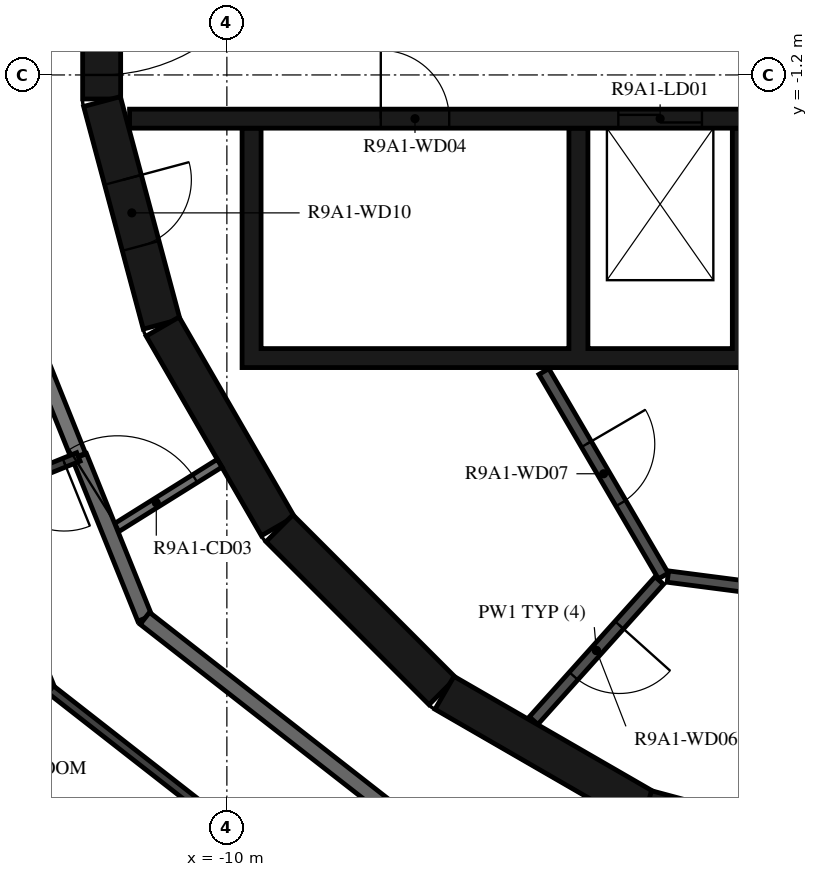
"""IFC4 building model, lengths in metres.
Left out: names, types, materials, properties, quantities, classifications, styles, units other than length and angle.
Written with IfcOpenShell. Run it as: python <this file> out.ifc"""

import sys

from ifc_helpers import new_model, si_unit, direction, frame, frame_2d, origin, place, context, subcontext, project, spatial, polyline, rectangle, outline, extrude, element, fill, save


model = new_model("IFC4")
c1 = context("Model", 3, precision=1e-05, world=origin(), true_north=direction((0.0, 1.0)))
c2 = subcontext(c1, "Body", "Model", "MODEL_VIEW")
j1 = project(units=[si_unit("LENGTHUNIT", "METRE"), si_unit("PLANEANGLEUNIT", "RADIAN")], contexts=[c1])
p1 = place(None, origin())
s1 = spatial("IfcSite", under=j1, at=p1, CompositionType="ELEMENT")
p2 = place(p1, origin())
s2 = spatial("IfcBuilding", under=s1, at=p2, CompositionType="ELEMENT")
p3 = place(p2, frame((0.0, 0.0, 336.5)))
s3 = spatial("IfcBuildingStorey", under=s2, at=p3, CompositionType="ELEMENT", Elevation=336.5)
p4 = place(p3, frame((-11.647, 1.516, 0.0), z_axis=(0.0, 0.0, 1.0), x_axis=(0.0, -1.0, 0.0)))
e1 = element("IfcWall", 1, at=p4, inside=s3, PredefinedType="SHEAR", context=c2, shape_type="SweptSolid", body=[
    extrude(rectangle(XDim=3.033, YDim=0.5, at=frame_2d((1.516, 0.0))), origin(), (0.0, 0.0, 1.0), 3.12),
])
p5 = place(p4, frame((0.316, 0.0, 0.0)))
e2 = element("IfcOpeningElement", 2, at=p5, cuts=e1, PredefinedType="OPENING", context=c2, shape_type="SweptSolid", body=[
    extrude(rectangle(XDim=2.4, YDim=2.1, at=frame_2d((1.2, 1.05))), frame((0.0, 0.26, 0.0), z_axis=(0.0, -1.0, 0.0), x_axis=(1.0, 0.0, 0.0)), (0.0, 0.0, 1.0), 0.52),
])
p6 = place(p3, frame((-11.643, -1.55, 0.0), z_axis=(0.0, 0.0, 1.0), x_axis=(0.258734743916, -0.965948410781, 0.0)))
e3 = element("IfcWall", 3, at=p6, inside=s3, PredefinedType="SHEAR", context=c2, shape_type="SweptSolid", body=[
    extrude(rectangle(XDim=3.033, YDim=0.5, at=frame_2d((1.516, 0.0))), origin(), (0.0, 0.0, 1.0), 3.12),
])
p7 = place(p6, frame((1.066, 0.0, 0.0)))
e4 = element("IfcOpeningElement", 4, at=p7, cuts=e3, PredefinedType="OPENING", context=c2, shape_type="SweptSolid", body=[
    extrude(rectangle(XDim=0.9, YDim=2.1, at=frame_2d((0.45, 1.05))), frame((0.0, 0.26, 0.0), z_axis=(0.0, -1.0, 0.0), x_axis=(1.0, 0.0, 0.0)), (0.0, 0.0, 1.0), 0.52),
])
p8 = place(p3, frame((-10.845, -4.51, 0.0), z_axis=(0.0, 0.0, 1.0), x_axis=(0.500087131594, -0.865975092491, 0.0)))
e5 = element("IfcWall", 5, at=p8, inside=s3, PredefinedType="SHEAR", context=c2, shape_type="SweptSolid", body=[
    extrude(rectangle(XDim=3.033, YDim=0.5, at=frame_2d((1.516, 0.0))), origin(), (0.0, 0.0, 1.0), 3.12),
])
p9 = place(p3, frame((-9.308, -7.164, 0.0), z_axis=(0.0, 0.0, 1.0), x_axis=(0.707106781187, -0.707106781187, 0.0)))
e6 = element("IfcWall", 6, at=p9, inside=s3, PredefinedType="SHEAR", context=c2, shape_type="SweptSolid", body=[
    extrude(rectangle(XDim=3.032, YDim=0.5, at=frame_2d((1.516, 0.0))), origin(), (0.0, 0.0, 1.0), 3.12),
])
for number, where, z_axis, x_axis in (
    (7, (-7.137, -9.329, 0.0), (0.0, 0.0, 1.0), (0.866, -0.5, 0.0)),
    (8, (-4.479, -10.858, 0.0), (0.0, 0.0, 1.0), (0.966, -0.259, 0.0)),
):
    element("IfcWall", number, at=place(p3, frame(where, z_axis=z_axis, x_axis=x_axis)), inside=s3, PredefinedType="SHEAR", context=c2, shape_type="SweptSolid", body=[
        extrude(rectangle(XDim=3.033, YDim=0.5, at=frame_2d((1.516, 0.0))), origin(), (0.0, 0.0, 1.0), 3.12),
    ])
p10 = place(p3, origin())
e9 = element("IfcWall", 9, at=p10, inside=s3, PredefinedType="SHEAR", context=c2, shape_type="SweptSolid", body=[
    extrude(outline(polyline([(9.8, -5.05), (9.8, -4.8), (9.8, -1.9), (9.55, -1.9), (9.55, -4.8), (7.65, -4.8), (7.65, -1.9), (7.4, -1.9), (7.4, -4.8), (5.5, -4.8), (5.5, -1.9), (5.25, -1.9), (5.25, -4.8), (3.35, -4.8), (3.35, -1.9), (3.1, -1.9), (3.1, -4.8), (1.2, -4.8), (1.2, -1.9), (0.95, -1.9), (0.95, -4.8), (-0.95, -4.8), (-0.95, -1.9), (-1.2, -1.9), (-1.2, -4.8), (-3.1, -4.8), (-3.1, -1.9), (-3.35, -1.9), (-3.35, -4.8), (-5.25, -4.8), (-5.25, -1.9), (-5.5, -1.9), (-5.5, -4.8), (-9.55, -4.8), (-9.55, -1.9), (-9.8, -1.9), (-9.8, -4.8), (-9.8, -5.05), (9.8, -5.05)])), origin(), (0.0, 0.0, 1.0), 3.12),
])
p11 = place(p3, frame((-11.28, -1.775, 0.0), z_axis=(0.0, 0.0, 1.0), x_axis=(1.0, 0.0, 0.0)))
e10 = element("IfcWall", 10, at=p11, inside=s3, PredefinedType="SHEAR", context=c2, shape_type="SweptSolid", body=[
    extrude(rectangle(XDim=14.38, YDim=0.25, at=frame_2d((7.19, 0.0))), origin(), (0.0, 0.0, 1.0), 3.12),
])
p12 = place(p11, frame((6.43, 0.0, 0.0)))
e11 = element("IfcOpeningElement", 11, at=p12, cuts=e10, PredefinedType="OPENING", context=c2, shape_type="SweptSolid", body=[
    extrude(rectangle(XDim=1.1, YDim=2.1, at=frame_2d((0.55, 1.05))), frame((0.0, 0.135, 0.0), z_axis=(0.0, -1.0, 0.0), x_axis=(1.0, 0.0, 0.0)), (0.0, 0.0, 1.0), 0.27),
])
p13 = place(p11, frame((8.58, 0.0, 0.0)))
e12 = element("IfcOpeningElement", 12, at=p13, cuts=e10, PredefinedType="OPENING", context=c2, shape_type="SweptSolid", body=[
    extrude(rectangle(XDim=1.1, YDim=2.1, at=frame_2d((0.55, 1.05))), frame((0.0, 0.135, 0.0), z_axis=(0.0, -1.0, 0.0), x_axis=(1.0, 0.0, 0.0)), (0.0, 0.0, 1.0), 0.27),
])
p14 = place(p11, frame((10.73, 0.0, 0.0)))
e13 = element("IfcOpeningElement", 13, at=p14, cuts=e10, PredefinedType="OPENING", context=c2, shape_type="SweptSolid", body=[
    extrude(rectangle(XDim=1.1, YDim=2.1, at=frame_2d((0.55, 1.05))), frame((0.0, 0.135, 0.0), z_axis=(0.0, -1.0, 0.0), x_axis=(1.0, 0.0, 0.0)), (0.0, 0.0, 1.0), 0.27),
])
p15 = place(p11, frame((3.305, 0.0, 0.0)))
e14 = element("IfcOpeningElement", 14, at=p15, cuts=e10, PredefinedType="OPENING", context=c2, shape_type="SweptSolid", body=[
    extrude(rectangle(XDim=0.9, YDim=2.1, at=frame_2d((0.45, 1.05))), frame((0.0, 0.135, 0.0), z_axis=(0.0, -1.0, 0.0), x_axis=(1.0, 0.0, 0.0)), (0.0, 0.0, 1.0), 0.27),
])
p16 = place(p11, frame((12.98, 0.0, 0.0)))
e15 = element("IfcOpeningElement", 15, at=p16, cuts=e10, PredefinedType="OPENING", context=c2, shape_type="SweptSolid", body=[
    extrude(rectangle(XDim=0.9, YDim=2.1, at=frame_2d((0.45, 1.05))), frame((0.0, 0.135, 0.0), z_axis=(0.0, -1.0, 0.0), x_axis=(1.0, 0.0, 0.0)), (0.0, 0.0, 1.0), 0.27),
])
p17 = place(p3, frame((-5.829, -5.102, 0.0), z_axis=(0.0, 0.0, 1.0), x_axis=(0.504480008384, -0.863423373057, 0.0)))
e16 = element("IfcWall", 16, at=p17, inside=s3, PredefinedType="PARTITIONING", context=c2, shape_type="SweptSolid", body=[
    extrude(rectangle(XDim=3.115, YDim=0.15, at=frame_2d((1.558, 0.0))), origin(), (0.0, 0.0, 1.0), 3.12),
])
p18 = place(p17, frame((1.107, 0.0, 0.0)))
e17 = element("IfcOpeningElement", 17, at=p18, cuts=e16, PredefinedType="OPENING", context=c2, shape_type="SweptSolid", body=[
    extrude(rectangle(XDim=0.9, YDim=2.1, at=frame_2d((0.45, 1.05))), frame((0.0, 0.085, 0.0), z_axis=(0.0, -1.0, 0.0), x_axis=(1.0, 0.0, 0.0)), (0.0, 0.0, 1.0), 0.17),
])
p19 = place(p3, frame((-4.311, -7.851, 0.0), z_axis=(0.0, 0.0, 1.0), x_axis=(-0.667869133096, -0.744278725383, 0.0)))
e18 = element("IfcWall", 18, at=p19, inside=s3, PredefinedType="PARTITIONING", context=c2, shape_type="SweptSolid", body=[
    extrude(rectangle(XDim=2.476, YDim=0.15, at=frame_2d((1.238, 0.0))), origin(), (0.0, 0.0, 1.0), 3.12),
])
p20 = place(p19, frame((0.788, 0.0, 0.0)))
e19 = element("IfcOpeningElement", 19, at=p20, cuts=e18, PredefinedType="OPENING", context=c2, shape_type="SweptSolid", body=[
    extrude(rectangle(XDim=0.9, YDim=2.1, at=frame_2d((0.45, 1.05))), frame((0.0, 0.085, 0.0), z_axis=(0.0, -1.0, 0.0), x_axis=(1.0, 0.0, 0.0)), (0.0, 0.0, 1.0), 0.17),
])
p21 = place(p3, frame((-4.198, -7.799, 0.0), z_axis=(0.0, 0.0, 1.0), x_axis=(0.991686747293, -0.128675542523, 0.0)))
e20 = element("IfcWall", 20, at=p21, inside=s3, PredefinedType="PARTITIONING", context=c2, shape_type="SweptSolid", body=[
    extrude(rectangle(XDim=1.793, YDim=0.15, at=frame_2d((0.896, 0.0))), origin(), (0.0, 0.0, 1.0), 3.12),
])
p22 = place(p3, frame((-11.539, -7.21, 0.0), z_axis=(0.0, 0.0, 1.0), x_axis=(0.848103039868, 0.529831325769, 0.0)))
e21 = element("IfcWall", 21, at=p22, inside=s3, PredefinedType="PARTITIONING", context=c2, shape_type="SweptSolid", body=[
    extrude(rectangle(XDim=1.702, YDim=0.12, at=frame_2d((0.851, 0.0))), origin(), (0.0, 0.0, 1.0), 3.12),
])
p23 = place(p22, frame((0.12, 0.0, 0.0)))
e22 = element("IfcOpeningElement", 22, at=p23, cuts=e21, PredefinedType="OPENING", context=c2, shape_type="SweptSolid", body=[
    extrude(rectangle(XDim=1.2, YDim=2.1, at=frame_2d((0.6, 1.05))), frame((0.0, 0.07, 0.0), z_axis=(0.0, -1.0, 0.0), x_axis=(1.0, 0.0, 0.0)), (0.0, 0.0, 1.0), 0.14),
])
p24 = place(p3, frame((-13.769, -1.691, 0.0), z_axis=(0.0, 0.0, 1.0), x_axis=(0.372720094028, -0.927943819155, 0.0)))
e23 = element("IfcWall", 23, at=p24, inside=s3, PredefinedType="STANDARD", context=c2, shape_type="SweptSolid", body=[
    extrude(rectangle(XDim=4.875, YDim=0.2, at=frame_2d((2.438, 0.0))), origin(), (0.0, 0.0, 1.0), 3.12),
])
p25 = place(p3, frame((-11.939, -6.22, 0.0), z_axis=(0.0, 0.0, 1.0), x_axis=(0.374651128394, -0.927165860024, 0.0)))
e24 = element("IfcWall", 24, at=p25, inside=s3, PredefinedType="STANDARD", context=c2, shape_type="SweptSolid", body=[
    extrude(rectangle(XDim=2.296, YDim=0.2, at=frame_2d((1.148, 0.0))), origin(), (0.0, 0.0, 1.0), 3.12),
])
p26 = place(p3, frame((-11.079, -8.349, 0.0), z_axis=(0.0, 0.0, 1.0), x_axis=(0.78800478687, -0.615669112324, 0.0)))
e25 = element("IfcWall", 25, at=p26, inside=s3, PredefinedType="STANDARD", context=c2, shape_type="SweptSolid", body=[
    extrude(rectangle(XDim=7.181, YDim=0.2, at=frame_2d((3.591, 0.0))), origin(), (0.0, 0.0, 1.0), 3.12),
])
p27 = place(p3, frame((-11.953, -6.225, 0.0), z_axis=(0.0, 0.0, 1.0), x_axis=(-0.927144096717, -0.374704982518, 0.0)))
e26 = element("IfcWall", 26, at=p27, inside=s3, PredefinedType="PARTITIONING", context=c2, shape_type="SweptSolid", body=[
    extrude(rectangle(XDim=1.485, YDim=0.12, at=frame_2d((0.742, 0.0))), origin(), (0.0, 0.0, 1.0), 3.12),
])
p28 = place(p27, frame((0.2, 0.0, 0.0)))
e27 = element("IfcOpeningElement", 27, at=p28, cuts=e26, PredefinedType="OPENING", context=c2, shape_type="SweptSolid", body=[
    extrude(rectangle(XDim=0.9, YDim=2.1, at=frame_2d((0.45, 1.05))), frame((0.0, 0.07, 0.0), z_axis=(0.0, -1.0, 0.0), x_axis=(1.0, 0.0, 0.0)), (0.0, 0.0, 1.0), 0.14),
])
p29 = place(p3, frame((-13.33, -6.782, 0.0), z_axis=(0.0, 0.0, 1.0), x_axis=(0.374602180132, -0.927185637637, 0.0)))
e28 = element("IfcWall", 28, at=p29, inside=s3, PredefinedType="PARTITIONING", context=c2, shape_type="SweptSolid", body=[
    extrude(rectangle(XDim=2.698, YDim=0.12, at=frame_2d((1.349, 0.0))), origin(), (0.0, 0.0, 1.0), 3.12),
])
p30 = place(p3, frame((-12.319, -9.283, 0.0), z_axis=(0.0, 0.0, 1.0), x_axis=(0.788000268464, -0.61567489546, 0.0)))
e29 = element("IfcWall", 29, at=p30, inside=s3, PredefinedType="PARTITIONING", context=c2, shape_type="SweptSolid", body=[
    extrude(rectangle(XDim=7.985, YDim=0.12, at=frame_2d((3.992, 0.0))), origin(), (0.0, 0.0, 1.0), 3.12),
])
p31 = place(p30, frame((3.619, 0.0, 0.0)))
e30 = element("IfcOpeningElement", 30, at=p31, cuts=e29, PredefinedType="OPENING", context=c2, shape_type="SweptSolid", body=[
    extrude(rectangle(XDim=0.9, YDim=2.1, at=frame_2d((0.45, 1.05))), frame((0.0, 0.07, 0.0), z_axis=(0.0, -1.0, 0.0), x_axis=(1.0, 0.0, 0.0)), (0.0, 0.0, 1.0), 0.14),
])
p32 = place(p5, origin())
e31 = element("IfcDoor", 31, at=p32, inside=s3, OperationType="DOUBLE_DOOR_SINGLE_SWING", PredefinedType="DOOR", context=c2, shape_type="SweptSolid", body=[
    extrude(rectangle(XDim=2.4, YDim=2.1, at=frame_2d((1.2, 1.05))), frame((0.0, 0.025, 0.0), z_axis=(0.0, -1.0, 0.0), x_axis=(1.0, 0.0, 0.0)), (0.0, 0.0, 1.0), 0.05),
])
fill(e2, e31)
p33 = place(p12, origin())
e32 = element("IfcDoor", 32, at=p33, inside=s3, OperationType="DOUBLE_DOOR_SLIDING", PredefinedType="DOOR", context=c2, shape_type="SweptSolid", body=[
    extrude(rectangle(XDim=1.1, YDim=2.1, at=frame_2d((0.55, 1.05))), frame((0.0, 0.025, 0.0), z_axis=(0.0, -1.0, 0.0), x_axis=(1.0, 0.0, 0.0)), (0.0, 0.0, 1.0), 0.05),
])
fill(e11, e32)
p34 = place(p15, origin())
e33 = element("IfcDoor", 33, at=p34, inside=s3, OperationType="SINGLE_SWING_RIGHT", PredefinedType="DOOR", context=c2, shape_type="SweptSolid", body=[
    extrude(rectangle(XDim=0.9, YDim=2.1, at=frame_2d((0.45, 1.05))), frame((0.0, 0.025, 0.0), z_axis=(0.0, -1.0, 0.0), x_axis=(1.0, 0.0, 0.0)), (0.0, 0.0, 1.0), 0.05),
])
fill(e14, e33)
p35 = place(p20, origin())
e34 = element("IfcDoor", 34, at=p35, inside=s3, OperationType="SINGLE_SWING_RIGHT", PredefinedType="DOOR", context=c2, shape_type="SweptSolid", body=[
    extrude(rectangle(XDim=0.9, YDim=2.1, at=frame_2d((0.45, 1.05))), frame((0.0, 0.025, 0.0), z_axis=(0.0, -1.0, 0.0), x_axis=(1.0, 0.0, 0.0)), (0.0, 0.0, 1.0), 0.05),
])
fill(e19, e34)
p36 = place(p18, origin())
e35 = element("IfcDoor", 35, at=p36, inside=s3, OperationType="SINGLE_SWING_LEFT", PredefinedType="DOOR", context=c2, shape_type="SweptSolid", body=[
    extrude(rectangle(XDim=0.9, YDim=2.1, at=frame_2d((0.45, 1.05))), frame((0.0, 0.025, 0.0), z_axis=(0.0, -1.0, 0.0), x_axis=(1.0, 0.0, 0.0)), (0.0, 0.0, 1.0), 0.05),
])
fill(e17, e35)
p37 = place(p7, origin())
e36 = element("IfcDoor", 36, at=p37, inside=s3, OperationType="SINGLE_SWING_RIGHT", PredefinedType="DOOR", context=c2, shape_type="SweptSolid", body=[
    extrude(rectangle(XDim=0.9, YDim=2.1, at=frame_2d((0.45, 1.05))), frame((0.0, 0.025, 0.0), z_axis=(0.0, -1.0, 0.0), x_axis=(1.0, 0.0, 0.0)), (0.0, 0.0, 1.0), 0.05),
])
fill(e4, e36)
p38 = place(p28, origin())
e37 = element("IfcDoor", 37, at=p38, inside=s3, OperationType="SINGLE_SWING_LEFT", PredefinedType="DOOR", context=c2, shape_type="SweptSolid", body=[
    extrude(rectangle(XDim=0.9, YDim=2.1, at=frame_2d((0.45, 1.05))), frame((0.0, 0.025, 0.0), z_axis=(0.0, -1.0, 0.0), x_axis=(1.0, 0.0, 0.0)), (0.0, 0.0, 1.0), 0.05),
])
fill(e27, e37)
p39 = place(p23, origin())
e38 = element("IfcDoor", 38, at=p39, inside=s3, OperationType="DOUBLE_DOOR_SINGLE_SWING", PredefinedType="DOOR", context=c2, shape_type="SweptSolid", body=[
    extrude(rectangle(XDim=1.2, YDim=2.1, at=frame_2d((0.6, 1.05))), frame((0.0, 0.025, 0.0), z_axis=(0.0, -1.0, 0.0), x_axis=(1.0, 0.0, 0.0)), (0.0, 0.0, 1.0), 0.05),
])
fill(e22, e38)
save(model, sys.argv[1])
